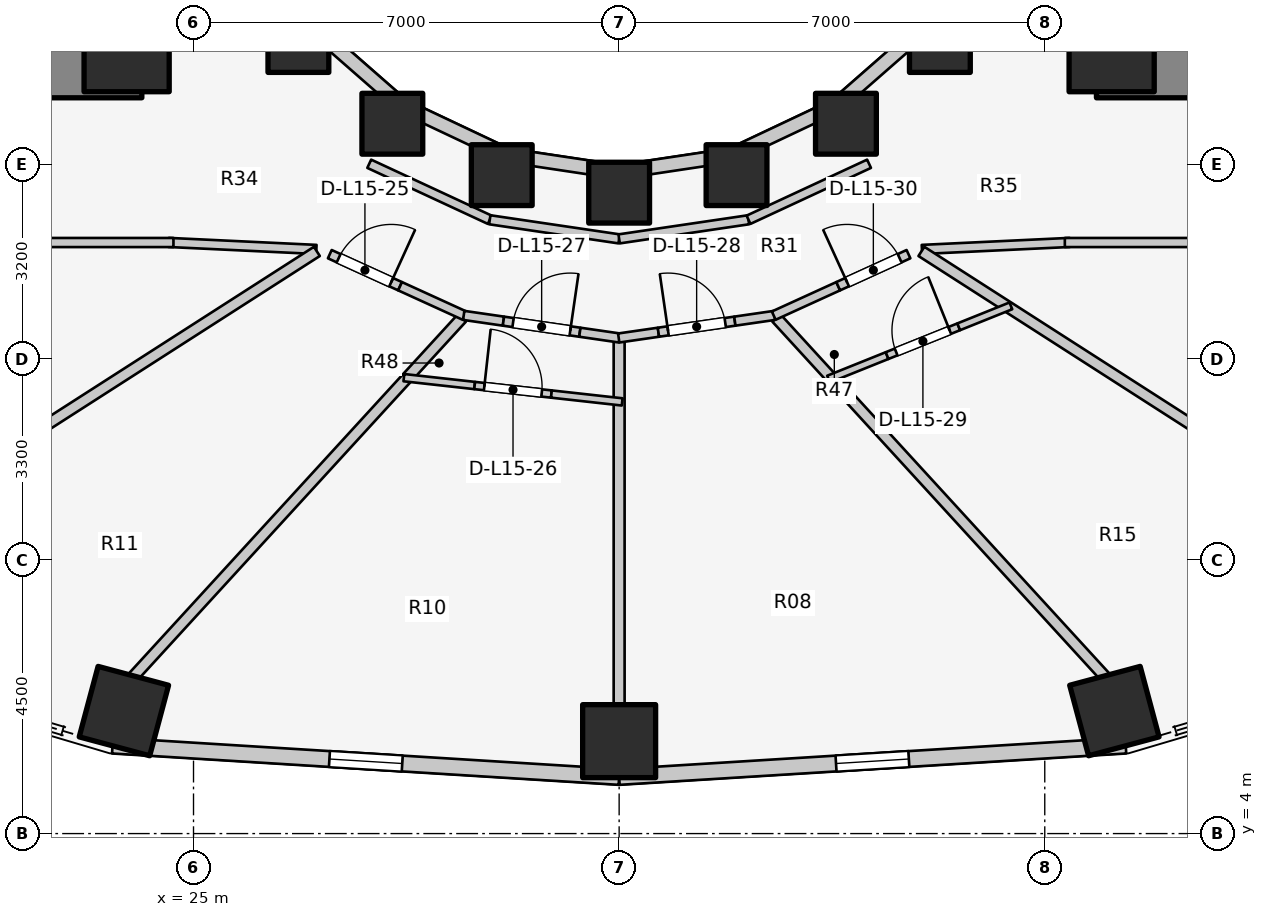
"""IFC4 building model, lengths in metres.
Left out: names, types, materials, properties, quantities, classifications, styles, units other than length and angle.
Written with IfcOpenShell. Run it as: python <this file> out.ifc"""

import sys

from ifc_helpers import new_model, si_unit, direction, frame, frame_2d, origin, origin_2d, place, context, subcontext, project, spatial, rectangle, extrude, element, fill, save


model = new_model("IFC4")
c1 = context("Model", 3, precision=1e-05, world=origin(), true_north=direction((0.0, 1.0)))
c2 = subcontext(c1, "Body", "Model", "MODEL_VIEW")
j1 = project(units=[si_unit("LENGTHUNIT", "METRE"), si_unit("PLANEANGLEUNIT", "RADIAN")], contexts=[c1])
p1 = place(None, origin())
s1 = spatial("IfcSite", under=j1, at=p1, CompositionType="ELEMENT")
p2 = place(p1, origin())
s2 = spatial("IfcBuilding", under=s1, at=p2, CompositionType="ELEMENT")
p3 = place(p2, frame((0.0, 0.0, 52.4)))
s3 = spatial("IfcBuildingStorey", under=s2, at=p3, CompositionType="ELEMENT", Elevation=52.4)
for number, where, z_axis, x_axis in (
    (1, (19.65, 16.55, 0.0), (0.0, 0.0, 1.0), (1.0, 0.0, 0.0)),
    (2, (39.85, 16.55, 0.0), (0.0, 0.0, 1.0), (1.0, 0.0, 0.0)),
):
    element("IfcWall", number, at=place(p3, frame(where, z_axis=z_axis, x_axis=x_axis)), inside=s3, PredefinedType="SHEAR", context=c2, shape_type="SweptSolid", body=[
        extrude(rectangle(XDim=4.5, YDim=0.9, at=frame_2d((2.25, 0.0))), origin(), (0.0, 0.0, 1.0), 3.1),
    ])
for number, where, z_axis, x_axis in (
    (3, (23.9, 16.9, 0.0), (0.0, 0.0, 1.0), (1.0, 0.0, 0.0)),
    (4, (40.1, 16.9, 0.0), (0.0, 0.0, 1.0), (1.0, 0.0, 0.0)),
):
    element("IfcColumn", number, at=place(p3, frame(where, z_axis=z_axis, x_axis=x_axis)), inside=s3, PredefinedType="COLUMN", context=c2, shape_type="SweptSolid", body=[
        extrude(rectangle(XDim=1.4, YDim=1.4, at=origin_2d()), origin(), (0.0, 0.0, 1.0), 3.1),
    ])
for number, where, z_axis, x_axis in (
    (5, (26.725, 17.018, 0.0), (0.0, 0.0, 1.0), (1.0, 0.0, 0.0)),
    (6, (28.27, 15.673, 0.0), (0.0, 0.0, 1.0), (1.0, 0.0, 0.0)),
    (7, (30.069, 14.828, 0.0), (0.0, 0.0, 1.0), (1.0, 0.0, 0.0)),
):
    element("IfcColumn", number, at=place(p3, frame(where, z_axis=z_axis, x_axis=x_axis)), inside=s3, PredefinedType="COLUMN", context=c2, shape_type="SweptSolid", body=[
        extrude(rectangle(XDim=1.0, YDim=1.0, at=origin_2d()), origin(), (0.0, 0.0, 1.0), 3.1),
    ])
p4 = place(p3, frame((23.855, 6.014, 0.0), z_axis=(0.0, 0.0, 1.0), x_axis=(-0.258819045103, -0.965925826289, 0.0)))
e8 = element("IfcColumn", 8, at=p4, inside=s3, PredefinedType="COLUMN", context=c2, shape_type="SweptSolid", body=[
    extrude(rectangle(XDim=1.2, YDim=1.2, at=origin_2d()), origin(), (0.0, 0.0, 1.0), 3.1),
])
p5 = place(p3, frame((32.0, 14.54, 0.0), z_axis=(0.0, 0.0, 1.0), x_axis=(1.0, 0.0, 0.0)))
e9 = element("IfcColumn", 9, at=p5, inside=s3, PredefinedType="COLUMN", context=c2, shape_type="SweptSolid", body=[
    extrude(rectangle(XDim=1.0, YDim=1.0, at=origin_2d()), origin(), (0.0, 0.0, 1.0), 3.1),
])
p6 = place(p3, frame((32.0, 5.52, 0.0), z_axis=(0.0, 0.0, 1.0), x_axis=(0.0, -1.0, 0.0)))
e10 = element("IfcColumn", 10, at=p6, inside=s3, PredefinedType="COLUMN", context=c2, shape_type="SweptSolid", body=[
    extrude(rectangle(XDim=1.2, YDim=1.2, at=origin_2d()), origin(), (0.0, 0.0, 1.0), 3.1),
])
p7 = place(p3, frame((33.931, 14.828, 0.0), z_axis=(0.0, 0.0, 1.0), x_axis=(1.0, 0.0, 0.0)))
e11 = element("IfcColumn", 11, at=p7, inside=s3, PredefinedType="COLUMN", context=c2, shape_type="SweptSolid", body=[
    extrude(rectangle(XDim=1.0, YDim=1.0, at=origin_2d()), origin(), (0.0, 0.0, 1.0), 3.1),
])
p8 = place(p3, frame((40.145, 6.014, 0.0), z_axis=(0.0, 0.0, 1.0), x_axis=(0.258819045103, -0.965925826289, 0.0)))
e12 = element("IfcColumn", 12, at=p8, inside=s3, PredefinedType="COLUMN", context=c2, shape_type="SweptSolid", body=[
    extrude(rectangle(XDim=1.2, YDim=1.2, at=origin_2d()), origin(), (0.0, 0.0, 1.0), 3.1),
])
for number, where, z_axis, x_axis in (
    (13, (35.73, 15.673, 0.0), (0.0, 0.0, 1.0), (1.0, 0.0, 0.0)),
    (14, (37.275, 17.018, 0.0), (0.0, 0.0, 1.0), (1.0, 0.0, 0.0)),
):
    element("IfcColumn", number, at=place(p3, frame(where, z_axis=z_axis, x_axis=x_axis)), inside=s3, PredefinedType="COLUMN", context=c2, shape_type="SweptSolid", body=[
        extrude(rectangle(XDim=1.0, YDim=1.0, at=origin_2d()), origin(), (0.0, 0.0, 1.0), 3.1),
    ])
p9 = place(p3, frame((26.965, 17.258, 0.0), z_axis=(0.0, 0.0, 1.0), x_axis=(0.752576694707, -0.658504607869, 0.0)))
e15 = element("IfcWall", 15, at=p9, inside=s3, PredefinedType="STANDARD", context=c2, shape_type="SweptSolid", body=[
    extrude(rectangle(XDim=1.959, YDim=0.23, at=frame_2d((0.98, 0.0))), origin(), (0.0, 0.0, 1.0), 1.22),
])
p10 = place(p3, frame((28.44, 15.968, 0.0), z_axis=(0.0, 0.0, 1.0), x_axis=(0.904179699603, -0.427152280606, 0.0)))
e16 = element("IfcWall", 16, at=p10, inside=s3, PredefinedType="STANDARD", context=c2, shape_type="SweptSolid", body=[
    extrude(rectangle(XDim=1.899, YDim=0.23, at=frame_2d((0.95, 0.0))), origin(), (0.0, 0.0, 1.0), 1.22),
])
for number, where, z_axis, x_axis in (
    (17, (30.157, 15.157, 0.0), (0.0, 0.0, 1.0), (0.989, -0.149, 0.0)),
    (18, (32.0, 14.88, 0.0), (0.0, 0.0, 1.0), (0.989, 0.149, 0.0)),
):
    element("IfcWall", number, at=place(p3, frame(where, z_axis=z_axis, x_axis=x_axis)), inside=s3, PredefinedType="STANDARD", context=c2, shape_type="SweptSolid", body=[
        extrude(rectangle(XDim=1.864, YDim=0.23, at=frame_2d((0.932, 0.0))), origin(), (0.0, 0.0, 1.0), 1.22),
    ])
p11 = place(p3, frame((33.843, 15.157, 0.0), z_axis=(0.0, 0.0, 1.0), x_axis=(0.904179699603, 0.427152280606, 0.0)))
e19 = element("IfcWall", 19, at=p11, inside=s3, PredefinedType="STANDARD", context=c2, shape_type="SweptSolid", body=[
    extrude(rectangle(XDim=1.899, YDim=0.23, at=frame_2d((0.95, 0.0))), origin(), (0.0, 0.0, 1.0), 1.22),
])
p12 = place(p3, frame((35.56, 15.968, 0.0), z_axis=(0.0, 0.0, 1.0), x_axis=(0.752576694707, 0.658504607869, 0.0)))
e20 = element("IfcWall", 20, at=p12, inside=s3, PredefinedType="STANDARD", context=c2, shape_type="SweptSolid", body=[
    extrude(rectangle(XDim=1.959, YDim=0.23, at=frame_2d((0.98, 0.0))), origin(), (0.0, 0.0, 1.0), 1.22),
])
p13 = place(p3, frame((23.668, 5.447, 0.0), z_axis=(0.0, 0.0, 1.0), x_axis=(0.998090514779, -0.061768311519, 0.0)))
e21 = element("IfcWall", 21, at=p13, inside=s3, PredefinedType="STANDARD", context=c2, shape_type="SweptSolid", body=[
    extrude(rectangle(XDim=8.348, YDim=0.26, at=frame_2d((4.174, 0.0))), origin(), (0.0, 0.0, 1.0), 1.22),
])
p14 = place(p13, frame((3.574, 0.0, 0.15)))
e22 = element("IfcOpeningElement", 22, at=p14, cuts=e21, PredefinedType="OPENING", context=c2, shape_type="SweptSolid", body=[
    extrude(rectangle(XDim=1.2, YDim=0.9, at=frame_2d((0.6, 0.45))), frame((0.0, 0.14, 0.0), z_axis=(0.0, -1.0, 0.0), x_axis=(1.0, 0.0, 0.0)), (0.0, 0.0, 1.0), 0.28),
])
p15 = place(p3, frame((32.0, 4.931, 0.0), z_axis=(0.0, 0.0, 1.0), x_axis=(0.998090514779, 0.061768311519, 0.0)))
e23 = element("IfcWall", 23, at=p15, inside=s3, PredefinedType="STANDARD", context=c2, shape_type="SweptSolid", body=[
    extrude(rectangle(XDim=8.348, YDim=0.26, at=frame_2d((4.174, 0.0))), origin(), (0.0, 0.0, 1.0), 1.22),
])
p16 = place(p15, frame((3.574, 0.0, 0.15)))
e24 = element("IfcOpeningElement", 24, at=p16, cuts=e23, PredefinedType="OPENING", context=c2, shape_type="SweptSolid", body=[
    extrude(rectangle(XDim=1.2, YDim=0.9, at=frame_2d((0.6, 0.45))), frame((0.0, 0.14, 0.0), z_axis=(0.0, -1.0, 0.0), x_axis=(1.0, 0.0, 0.0)), (0.0, 0.0, 1.0), 0.28),
])
p17 = place(p3, frame((27.89, 15.015, 0.0), z_axis=(0.0, 0.0, 1.0), x_axis=(0.906943449489, -0.421252393975, 0.0)))
e25 = element("IfcWall", 25, at=p17, inside=s3, PredefinedType="PARTITIONING", context=c2, shape_type="SweptSolid", body=[
    extrude(rectangle(XDim=2.186, YDim=0.15, at=frame_2d((1.093, 0.0))), origin(), (0.0, 0.0, 1.0), 1.22),
])
for number, where, z_axis, x_axis in (
    (26, (29.873, 14.094, 0.0), (0.0, 0.0, 1.0), (0.989, -0.146, 0.0)),
    (27, (32.0, 13.78, 0.0), (0.0, 0.0, 1.0), (0.989, 0.146, 0.0)),
):
    element("IfcWall", number, at=place(p3, frame(where, z_axis=z_axis, x_axis=x_axis)), inside=s3, PredefinedType="PARTITIONING", context=c2, shape_type="SweptSolid", body=[
        extrude(rectangle(XDim=2.151, YDim=0.15, at=frame_2d((1.075, 0.0))), origin(), (0.0, 0.0, 1.0), 1.22),
    ])
p18 = place(p3, frame((34.127, 14.094, 0.0), z_axis=(0.0, 0.0, 1.0), x_axis=(0.906943449489, 0.421252393975, 0.0)))
e28 = element("IfcWall", 28, at=p18, inside=s3, PredefinedType="PARTITIONING", context=c2, shape_type="SweptSolid", body=[
    extrude(rectangle(XDim=2.186, YDim=0.15, at=frame_2d((1.093, 0.0))), origin(), (0.0, 0.0, 1.0), 1.22),
])
p19 = place(p3, frame((27.02, 13.606, 0.0), z_axis=(0.0, 0.0, 1.0), x_axis=(-0.998877427952, 0.047369651964, 0.0)))
e29 = element("IfcWall", 29, at=p19, inside=s3, PredefinedType="PARTITIONING", context=c2, shape_type="SweptSolid", body=[
    extrude(rectangle(XDim=2.433, YDim=0.15, at=frame_2d((1.216, 0.0))), origin(), (0.0, 0.0, 1.0), 1.22),
])
p20 = place(p3, frame((19.51, 13.72, 0.0), z_axis=(0.0, 0.0, 1.0), x_axis=(1.0, 0.0, 0.0)))
e30 = element("IfcWall", 30, at=p20, inside=s3, PredefinedType="PARTITIONING", context=c2, shape_type="SweptSolid", body=[
    extrude(rectangle(XDim=5.16, YDim=0.15, at=frame_2d((2.58, 0.0))), origin(), (0.0, 0.0, 1.0), 1.22),
])
p21 = place(p3, frame((36.98, 13.606, 0.0), z_axis=(0.0, 0.0, 1.0), x_axis=(0.998877427952, 0.047369651964, 0.0)))
e31 = element("IfcWall", 31, at=p21, inside=s3, PredefinedType="PARTITIONING", context=c2, shape_type="SweptSolid", body=[
    extrude(rectangle(XDim=2.433, YDim=0.15, at=frame_2d((1.216, 0.0))), origin(), (0.0, 0.0, 1.0), 1.22),
])
p22 = place(p3, frame((39.33, 13.72, 0.0), z_axis=(0.0, 0.0, 1.0), x_axis=(1.0, 0.0, 0.0)))
e32 = element("IfcWall", 32, at=p22, inside=s3, PredefinedType="PARTITIONING", context=c2, shape_type="SweptSolid", body=[
    extrude(rectangle(XDim=5.06, YDim=0.15, at=frame_2d((2.53, 0.0))), origin(), (0.0, 0.0, 1.0), 1.22),
])
p23 = place(p3, frame((27.029, 13.574, 0.0), z_axis=(0.0, 0.0, 1.0), x_axis=(-0.841689919529, -0.5399611832, 0.0)))
e33 = element("IfcWall", 33, at=p23, inside=s3, PredefinedType="PARTITIONING", context=c2, shape_type="SweptSolid", body=[
    extrude(rectangle(XDim=10.058, YDim=0.18, at=frame_2d((5.029, 0.0))), origin(), (0.0, 0.0, 1.0), 1.22),
])
p24 = place(p3, frame((29.414, 12.479, 0.0), z_axis=(0.0, 0.0, 1.0), x_axis=(-0.675465011224, -0.737392038615, 0.0)))
e34 = element("IfcWall", 34, at=p24, inside=s3, PredefinedType="PARTITIONING", context=c2, shape_type="SweptSolid", body=[
    extrude(rectangle(XDim=8.007, YDim=0.18, at=frame_2d((4.003, 0.0))), origin(), (0.0, 0.0, 1.0), 1.22),
])
p25 = place(p3, frame((32.0, 12.095, 0.0), z_axis=(0.0, 0.0, 1.0), x_axis=(0.0, -1.0, 0.0)))
e35 = element("IfcWall", 35, at=p25, inside=s3, PredefinedType="PARTITIONING", context=c2, shape_type="SweptSolid", body=[
    extrude(rectangle(XDim=5.995, YDim=0.18, at=frame_2d((2.998, 0.0))), origin(), (0.0, 0.0, 1.0), 1.22),
])
p26 = place(p3, frame((34.586, 12.479, 0.0), z_axis=(0.0, 0.0, 1.0), x_axis=(0.675465011224, -0.737392038615, 0.0)))
e36 = element("IfcWall", 36, at=p26, inside=s3, PredefinedType="PARTITIONING", context=c2, shape_type="SweptSolid", body=[
    extrude(rectangle(XDim=8.007, YDim=0.18, at=frame_2d((4.003, 0.0))), origin(), (0.0, 0.0, 1.0), 1.22),
])
p27 = place(p3, frame((36.971, 13.574, 0.0), z_axis=(0.0, 0.0, 1.0), x_axis=(0.841689919529, -0.5399611832, 0.0)))
e37 = element("IfcWall", 37, at=p27, inside=s3, PredefinedType="PARTITIONING", context=c2, shape_type="SweptSolid", body=[
    extrude(rectangle(XDim=10.058, YDim=0.18, at=frame_2d((5.029, 0.0))), origin(), (0.0, 0.0, 1.0), 1.22),
])
p28 = place(p3, frame((27.241, 13.529, 0.0), z_axis=(0.0, 0.0, 1.0), x_axis=(0.909740090182, -0.415178236804, 0.0)))
e38 = element("IfcWall", 38, at=p28, inside=s3, PredefinedType="PARTITIONING", context=c2, shape_type="SweptSolid", body=[
    extrude(rectangle(XDim=1.27, YDim=0.15, at=frame_2d((0.635, 0.0))), origin(), (0.0, 0.0, 1.0), 2.16),
])
p29 = place(p28, frame((0.16, 0.0, 0.0)))
e39 = element("IfcOpeningElement", 39, at=p29, cuts=e38, PredefinedType="OPENING", context=c2, shape_type="SweptSolid", body=[
    extrude(rectangle(XDim=0.95, YDim=2.1, at=frame_2d((0.475, 1.05))), frame((0.0, 0.085, 0.0), z_axis=(0.0, -1.0, 0.0), x_axis=(1.0, 0.0, 0.0)), (0.0, 0.0, 1.0), 0.17),
])
p30 = place(p3, frame((28.397, 13.001, 0.0), z_axis=(0.0, 0.0, 1.0), x_axis=(0.909741327194, -0.415175526249, 0.0)))
e40 = element("IfcWall", 40, at=p30, inside=s3, PredefinedType="PARTITIONING", context=c2, shape_type="SweptSolid", body=[
    extrude(rectangle(XDim=1.166, YDim=0.15, at=frame_2d((0.583, 0.0))), origin(), (0.0, 0.0, 1.0), 1.22),
])
p31 = place(p3, frame((28.46, 11.498, 0.0), z_axis=(0.0, 0.0, 1.0), x_axis=(0.993876104587, -0.110500175253, 0.0)))
e41 = element("IfcWall", 41, at=p31, inside=s3, PredefinedType="MOVABLE", context=c2, shape_type="SweptSolid", body=[
    extrude(rectangle(XDim=1.171, YDim=0.12, at=frame_2d((0.585, 0.0))), origin(), (0.0, 0.0, 1.0), 2.575),
])
p32 = place(p3, frame((29.624, 11.368, 0.0), z_axis=(0.0, 0.0, 1.0), x_axis=(0.993895448934, -0.110326046739, 0.0)))
e42 = element("IfcWall", 42, at=p32, inside=s3, PredefinedType="MOVABLE", context=c2, shape_type="SweptSolid", body=[
    extrude(rectangle(XDim=1.27, YDim=0.12, at=frame_2d((0.635, 0.0))), origin(), (0.0, 0.0, 1.0), 2.575),
])
p33 = place(p32, frame((0.16, 0.0, 0.0)))
e43 = element("IfcOpeningElement", 43, at=p33, cuts=e42, PredefinedType="OPENING", context=c2, shape_type="SweptSolid", body=[
    extrude(rectangle(XDim=0.95, YDim=2.1, at=frame_2d((0.475, 1.05))), frame((0.0, 0.07, 0.0), z_axis=(0.0, -1.0, 0.0), x_axis=(1.0, 0.0, 0.0)), (0.0, 0.0, 1.0), 0.14),
])
p34 = place(p3, frame((30.886, 11.228, 0.0), z_axis=(0.0, 0.0, 1.0), x_axis=(0.993876104587, -0.110500175253, 0.0)))
e44 = element("IfcWall", 44, at=p34, inside=s3, PredefinedType="MOVABLE", context=c2, shape_type="SweptSolid", body=[
    extrude(rectangle(XDim=1.171, YDim=0.12, at=frame_2d((0.585, 0.0))), origin(), (0.0, 0.0, 1.0), 1.22),
])
p35 = place(p3, frame((29.444, 12.522, 0.0), z_axis=(0.0, 0.0, 1.0), x_axis=(0.989643848527, -0.143544603076, 0.0)))
e45 = element("IfcWall", 45, at=p35, inside=s3, PredefinedType="PARTITIONING", context=c2, shape_type="SweptSolid", body=[
    extrude(rectangle(XDim=0.66, YDim=0.15, at=frame_2d((0.33, 0.0))), origin(), (0.0, 0.0, 1.0), 2.575),
])
p36 = place(p3, frame((30.097, 12.427, 0.0), z_axis=(0.0, 0.0, 1.0), x_axis=(0.989635669595, -0.143600980029, 0.0)))
e46 = element("IfcWall", 46, at=p36, inside=s3, PredefinedType="PARTITIONING", context=c2, shape_type="SweptSolid", body=[
    extrude(rectangle(XDim=1.27, YDim=0.15, at=frame_2d((0.635, 0.0))), origin(), (0.0, 0.0, 1.0), 2.575),
])
p37 = place(p36, frame((0.16, 0.0, 0.0)))
e47 = element("IfcOpeningElement", 47, at=p37, cuts=e46, PredefinedType="OPENING", context=c2, shape_type="SweptSolid", body=[
    extrude(rectangle(XDim=0.95, YDim=2.1, at=frame_2d((0.475, 1.05))), frame((0.0, 0.085, 0.0), z_axis=(0.0, -1.0, 0.0), x_axis=(1.0, 0.0, 0.0)), (0.0, 0.0, 1.0), 0.17),
])
p38 = place(p3, frame((31.354, 12.245, 0.0), z_axis=(0.0, 0.0, 1.0), x_axis=(0.989636221287, -0.143597177958, 0.0)))
e48 = element("IfcWall", 48, at=p38, inside=s3, PredefinedType="PARTITIONING", context=c2, shape_type="SweptSolid", body=[
    extrude(rectangle(XDim=0.66, YDim=0.15, at=frame_2d((0.33, 0.0))), origin(), (0.0, 0.0, 1.0), 1.22),
])
p39 = place(p3, frame((31.993, 12.15, 0.0), z_axis=(0.0, 0.0, 1.0), x_axis=(0.989643848527, 0.143544603076, 0.0)))
e49 = element("IfcWall", 49, at=p39, inside=s3, PredefinedType="PARTITIONING", context=c2, shape_type="SweptSolid", body=[
    extrude(rectangle(XDim=0.66, YDim=0.15, at=frame_2d((0.33, 0.0))), origin(), (0.0, 0.0, 1.0), 1.22),
])
p40 = place(p3, frame((32.646, 12.245, 0.0), z_axis=(0.0, 0.0, 1.0), x_axis=(0.989635669595, 0.143600980029, 0.0)))
e50 = element("IfcWall", 50, at=p40, inside=s3, PredefinedType="PARTITIONING", context=c2, shape_type="SweptSolid", body=[
    extrude(rectangle(XDim=1.27, YDim=0.15, at=frame_2d((0.635, 0.0))), origin(), (0.0, 0.0, 1.0), 2.575),
])
p41 = place(p40, frame((0.16, 0.0, 0.0)))
e51 = element("IfcOpeningElement", 51, at=p41, cuts=e50, PredefinedType="OPENING", context=c2, shape_type="SweptSolid", body=[
    extrude(rectangle(XDim=0.95, YDim=2.1, at=frame_2d((0.475, 1.05))), frame((0.0, 0.085, 0.0), z_axis=(0.0, -1.0, 0.0), x_axis=(1.0, 0.0, 0.0)), (0.0, 0.0, 1.0), 0.17),
])
p42 = place(p3, frame((33.903, 12.427, 0.0), z_axis=(0.0, 0.0, 1.0), x_axis=(0.989636221287, 0.143597177958, 0.0)))
e52 = element("IfcWall", 52, at=p42, inside=s3, PredefinedType="PARTITIONING", context=c2, shape_type="SweptSolid", body=[
    extrude(rectangle(XDim=0.66, YDim=0.15, at=frame_2d((0.33, 0.0))), origin(), (0.0, 0.0, 1.0), 2.575),
])
p43 = place(p3, frame((35.444, 11.474, 0.0), z_axis=(0.0, 0.0, 1.0), x_axis=(0.927842429586, 0.372972419704, 0.0)))
e53 = element("IfcWall", 53, at=p43, inside=s3, PredefinedType="MOVABLE", context=c2, shape_type="SweptSolid", body=[
    extrude(rectangle(XDim=1.038, YDim=0.12, at=frame_2d((0.519, 0.0))), origin(), (0.0, 0.0, 1.0), 1.22),
])
p44 = place(p3, frame((36.407, 11.861, 0.0), z_axis=(0.0, 0.0, 1.0), x_axis=(0.927932127314, 0.372749201339, 0.0)))
e54 = element("IfcWall", 54, at=p44, inside=s3, PredefinedType="MOVABLE", context=c2, shape_type="SweptSolid", body=[
    extrude(rectangle(XDim=1.27, YDim=0.12, at=frame_2d((0.635, 0.0))), origin(), (0.0, 0.0, 1.0), 2.16),
])
p45 = place(p44, frame((0.16, 0.0, 0.0)))
e55 = element("IfcOpeningElement", 55, at=p45, cuts=e54, PredefinedType="OPENING", context=c2, shape_type="SweptSolid", body=[
    extrude(rectangle(XDim=0.95, YDim=2.1, at=frame_2d((0.475, 1.05))), frame((0.0, 0.07, 0.0), z_axis=(0.0, -1.0, 0.0), x_axis=(1.0, 0.0, 0.0)), (0.0, 0.0, 1.0), 0.14),
])
p46 = place(p3, frame((37.585, 12.334, 0.0), z_axis=(0.0, 0.0, 1.0), x_axis=(0.927874016973, 0.372893830233, 0.0)))
e56 = element("IfcWall", 56, at=p46, inside=s3, PredefinedType="MOVABLE", context=c2, shape_type="SweptSolid", body=[
    extrude(rectangle(XDim=0.924, YDim=0.12, at=frame_2d((0.462, 0.0))), origin(), (0.0, 0.0, 1.0), 2.575),
])
p47 = place(p3, frame((34.543, 12.518, 0.0), z_axis=(0.0, 0.0, 1.0), x_axis=(0.909741327194, 0.415175526249, 0.0)))
e57 = element("IfcWall", 57, at=p47, inside=s3, PredefinedType="PARTITIONING", context=c2, shape_type="SweptSolid", body=[
    extrude(rectangle(XDim=1.166, YDim=0.15, at=frame_2d((0.583, 0.0))), origin(), (0.0, 0.0, 1.0), 1.22),
])
p48 = place(p3, frame((35.603, 13.001, 0.0), z_axis=(0.0, 0.0, 1.0), x_axis=(0.909740090182, 0.415178236804, 0.0)))
e58 = element("IfcWall", 58, at=p48, inside=s3, PredefinedType="PARTITIONING", context=c2, shape_type="SweptSolid", body=[
    extrude(rectangle(XDim=1.27, YDim=0.15, at=frame_2d((0.635, 0.0))), origin(), (0.0, 0.0, 1.0), 2.16),
])
p49 = place(p48, frame((0.16, 0.0, 0.0)))
e59 = element("IfcOpeningElement", 59, at=p49, cuts=e58, PredefinedType="OPENING", context=c2, shape_type="SweptSolid", body=[
    extrude(rectangle(XDim=0.95, YDim=2.1, at=frame_2d((0.475, 1.05))), frame((0.0, 0.085, 0.0), z_axis=(0.0, -1.0, 0.0), x_axis=(1.0, 0.0, 0.0)), (0.0, 0.0, 1.0), 0.17),
])
p50 = place(p14, origin())
e60 = element("IfcWindow", 60, at=p50, inside=s3, PartitioningType="SINGLE_PANEL", PredefinedType="WINDOW", context=c2, shape_type="SweptSolid", body=[
    extrude(rectangle(XDim=1.2, YDim=0.9, at=frame_2d((0.6, 0.45))), frame((0.0, 0.03, 0.0), z_axis=(0.0, -1.0, 0.0), x_axis=(1.0, 0.0, 0.0)), (0.0, 0.0, 1.0), 0.06),
])
fill(e22, e60)
p51 = place(p16, origin())
e61 = element("IfcWindow", 61, at=p51, inside=s3, PartitioningType="SINGLE_PANEL", PredefinedType="WINDOW", context=c2, shape_type="SweptSolid", body=[
    extrude(rectangle(XDim=1.2, YDim=0.9, at=frame_2d((0.6, 0.45))), frame((0.0, 0.03, 0.0), z_axis=(0.0, -1.0, 0.0), x_axis=(1.0, 0.0, 0.0)), (0.0, 0.0, 1.0), 0.06),
])
fill(e24, e61)
p52 = place(p29, origin())
e62 = element("IfcDoor", 62, at=p52, inside=s3, OperationType="SINGLE_SWING_RIGHT", PredefinedType="DOOR", context=c2, shape_type="SweptSolid", body=[
    extrude(rectangle(XDim=0.95, YDim=2.1, at=frame_2d((0.475, 1.05))), frame((0.0, 0.025, 0.0), z_axis=(0.0, -1.0, 0.0), x_axis=(1.0, 0.0, 0.0)), (0.0, 0.0, 1.0), 0.05),
])
fill(e39, e62)
p53 = place(p33, origin())
e63 = element("IfcDoor", 63, at=p53, inside=s3, OperationType="SINGLE_SWING_LEFT", PredefinedType="DOOR", context=c2, shape_type="SweptSolid", body=[
    extrude(rectangle(XDim=0.95, YDim=2.1, at=frame_2d((0.475, 1.05))), frame((0.0, 0.025, 0.0), z_axis=(0.0, -1.0, 0.0), x_axis=(1.0, 0.0, 0.0)), (0.0, 0.0, 1.0), 0.05),
])
fill(e43, e63)
p54 = place(p37, origin())
e64 = element("IfcDoor", 64, at=p54, inside=s3, OperationType="SINGLE_SWING_RIGHT", PredefinedType="DOOR", context=c2, shape_type="SweptSolid", body=[
    extrude(rectangle(XDim=0.95, YDim=2.1, at=frame_2d((0.475, 1.05))), frame((0.0, 0.025, 0.0), z_axis=(0.0, -1.0, 0.0), x_axis=(1.0, 0.0, 0.0)), (0.0, 0.0, 1.0), 0.05),
])
fill(e47, e64)
p55 = place(p41, origin())
e65 = element("IfcDoor", 65, at=p55, inside=s3, OperationType="SINGLE_SWING_LEFT", PredefinedType="DOOR", context=c2, shape_type="SweptSolid", body=[
    extrude(rectangle(XDim=0.95, YDim=2.1, at=frame_2d((0.475, 1.05))), frame((0.0, 0.025, 0.0), z_axis=(0.0, -1.0, 0.0), x_axis=(1.0, 0.0, 0.0)), (0.0, 0.0, 1.0), 0.05),
])
fill(e51, e65)
p56 = place(p45, origin())
e66 = element("IfcDoor", 66, at=p56, inside=s3, OperationType="SINGLE_SWING_RIGHT", PredefinedType="DOOR", context=c2, shape_type="SweptSolid", body=[
    extrude(rectangle(XDim=0.95, YDim=2.1, at=frame_2d((0.475, 1.05))), frame((0.0, 0.025, 0.0), z_axis=(0.0, -1.0, 0.0), x_axis=(1.0, 0.0, 0.0)), (0.0, 0.0, 1.0), 0.05),
])
fill(e55, e66)
p57 = place(p49, origin())
e67 = element("IfcDoor", 67, at=p57, inside=s3, OperationType="SINGLE_SWING_LEFT", PredefinedType="DOOR", context=c2, shape_type="SweptSolid", body=[
    extrude(rectangle(XDim=0.95, YDim=2.1, at=frame_2d((0.475, 1.05))), frame((0.0, 0.025, 0.0), z_axis=(0.0, -1.0, 0.0), x_axis=(1.0, 0.0, 0.0)), (0.0, 0.0, 1.0), 0.05),
])
fill(e59, e67)
save(model, sys.argv[1])
